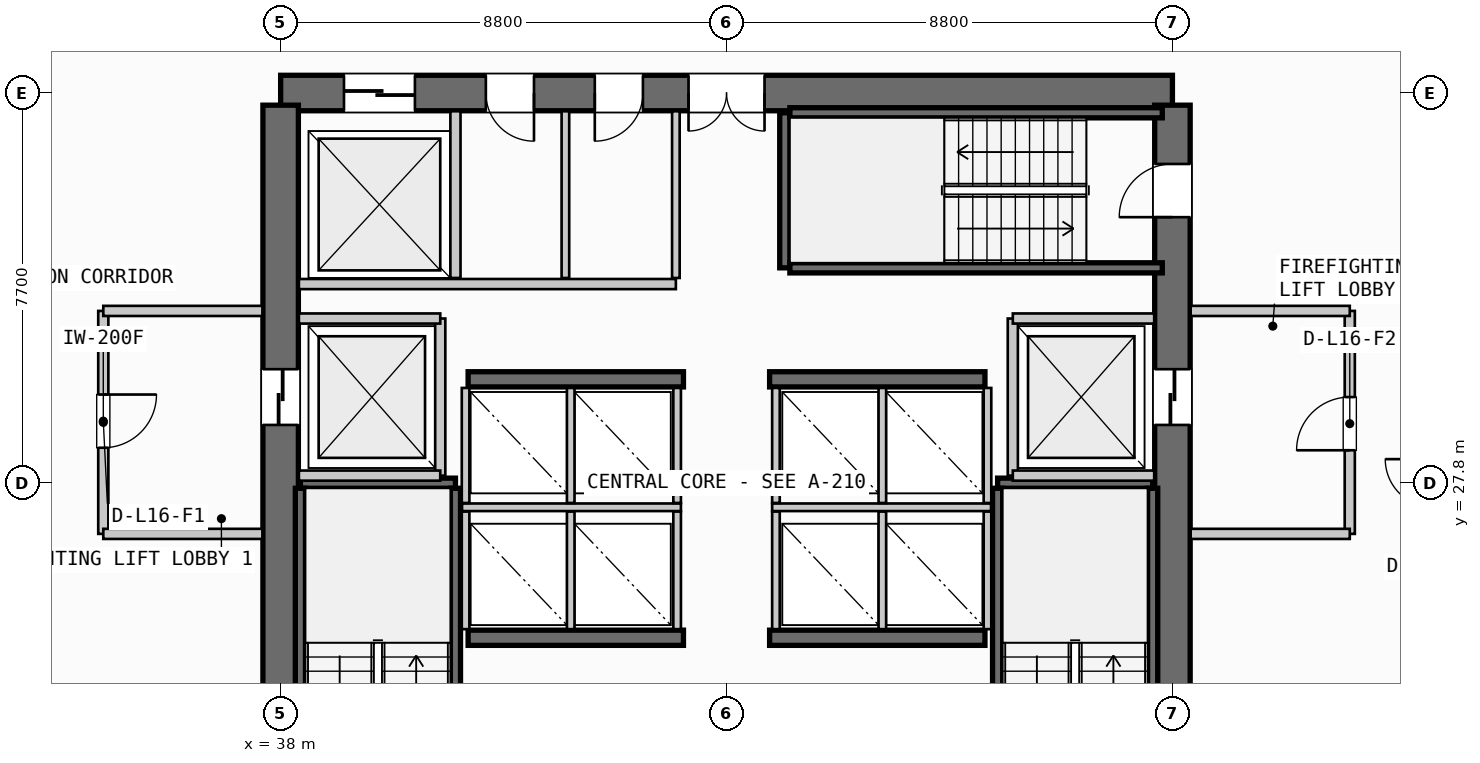
"""IFC4 building model, lengths in metres.
Left out: names, types, materials, properties, quantities, classifications, styles, units other than length and angle.
Written with IfcOpenShell. Run it as: python <this file> out.ifc"""

import sys

from ifc_helpers import new_model, si_unit, direction, frame, frame_2d, origin, place, context, subcontext, project, spatial, rectangle, extrude, source, transform, mapped, element, fill, save


model = new_model("IFC4")
c1 = context("Model", 3, precision=1e-05, world=origin(), true_north=direction((0.0, 1.0)))
c2 = subcontext(c1, "Body", "Model", "MODEL_VIEW")
j1 = project(units=[si_unit("LENGTHUNIT", "METRE"), si_unit("PLANEANGLEUNIT", "RADIAN")], contexts=[c1])
p1 = place(None, origin())
s1 = spatial("IfcSite", under=j1, at=p1, CompositionType="ELEMENT")
p2 = place(p1, origin())
s2 = spatial("IfcBuilding", under=s1, at=p2, CompositionType="ELEMENT")
p3 = place(p2, frame((0.0, 0.0, 67.6)))
s3 = spatial("IfcBuildingStorey", under=s2, at=p3, CompositionType="ELEMENT", Elevation=67.6)
p4 = place(p3, frame((55.6, 35.5, 0.0), z_axis=(0.0, 0.0, 1.0), x_axis=(-1.0, 0.0, 0.0)))
e1 = element("IfcWall", 1, at=p4, inside=s3, PredefinedType="SHEAR", context=c2, shape_type="SweptSolid", body=[
    extrude(rectangle(XDim=17.6, YDim=0.7, at=frame_2d((8.8, 0.0))), origin(), (0.0, 0.0, 1.0), 3.55),
])
p5 = place(p4, frame((8.05, 0.0, 0.0)))
e2 = element("IfcOpeningElement", 2, at=p5, cuts=e1, PredefinedType="OPENING", context=c2, shape_type="SweptSolid", body=[
    extrude(rectangle(XDim=1.5, YDim=2.2, at=frame_2d((0.75, 1.1))), frame((0.0, 0.36, 0.0), z_axis=(0.0, -1.0, 0.0), x_axis=(1.0, 0.0, 0.0)), (0.0, 0.0, 1.0), 0.72),
])
p6 = place(p4, frame((14.95, 0.0, 0.0)))
e3 = element("IfcOpeningElement", 3, at=p6, cuts=e1, PredefinedType="OPENING", context=c2, shape_type="SweptSolid", body=[
    extrude(rectangle(XDim=1.4, YDim=2.3, at=frame_2d((0.7, 1.15))), frame((0.0, 0.36, 0.0), z_axis=(0.0, -1.0, 0.0), x_axis=(1.0, 0.0, 0.0)), (0.0, 0.0, 1.0), 0.72),
])
p7 = place(p4, frame((12.6, 0.0, 0.0)))
e4 = element("IfcOpeningElement", 4, at=p7, cuts=e1, PredefinedType="OPENING", context=c2, shape_type="SweptSolid", body=[
    extrude(rectangle(XDim=0.95, YDim=2.15, at=frame_2d((0.475, 1.075))), frame((0.0, 0.36, 0.0), z_axis=(0.0, -1.0, 0.0), x_axis=(1.0, 0.0, 0.0)), (0.0, 0.0, 1.0), 0.72),
])
p8 = place(p4, frame((10.45, 0.0, 0.0)))
e5 = element("IfcOpeningElement", 5, at=p8, cuts=e1, PredefinedType="OPENING", context=c2, shape_type="SweptSolid", body=[
    extrude(rectangle(XDim=0.95, YDim=2.15, at=frame_2d((0.475, 1.075))), frame((0.0, 0.36, 0.0), z_axis=(0.0, -1.0, 0.0), x_axis=(1.0, 0.0, 0.0)), (0.0, 0.0, 1.0), 0.72),
])
p9 = place(p3, frame((38.0, 35.26, 0.0), z_axis=(0.0, 0.0, 1.0), x_axis=(0.0, -1.0, 0.0)))
e6 = element("IfcWall", 6, at=p9, inside=s3, PredefinedType="SHEAR", context=c2, shape_type="SweptSolid", body=[
    extrude(rectangle(XDim=14.92, YDim=0.7, at=frame_2d((7.46, 0.0))), origin(), (0.0, 0.0, 1.0), 3.55),
])
p10 = place(p9, frame((5.21, 0.0, 0.0)))
e7 = element("IfcOpeningElement", 7, at=p10, cuts=e6, PredefinedType="OPENING", context=c2, shape_type="SweptSolid", body=[
    extrude(rectangle(XDim=1.1, YDim=2.2, at=frame_2d((0.55, 1.1))), frame((0.0, 0.36, 0.0), z_axis=(0.0, -1.0, 0.0), x_axis=(1.0, 0.0, 0.0)), (0.0, 0.0, 1.0), 0.72),
])
p11 = place(p3, frame((55.6, 20.34, 0.0), z_axis=(0.0, 0.0, 1.0), x_axis=(0.0, 1.0, 0.0)))
e8 = element("IfcWall", 8, at=p11, inside=s3, PredefinedType="SHEAR", context=c2, shape_type="SweptSolid", body=[
    extrude(rectangle(XDim=14.92, YDim=0.7, at=frame_2d((7.46, 0.0))), origin(), (0.0, 0.0, 1.0), 3.55),
])
p12 = place(p11, frame((12.71, 0.0, 0.0)))
e9 = element("IfcOpeningElement", 9, at=p12, cuts=e8, PredefinedType="OPENING", context=c2, shape_type="SweptSolid", body=[
    extrude(rectangle(XDim=1.05, YDim=2.15, at=frame_2d((0.525, 1.075))), frame((0.0, 0.36, 0.0), z_axis=(0.0, -1.0, 0.0), x_axis=(1.0, 0.0, 0.0)), (0.0, 0.0, 1.0), 0.72),
])
p13 = place(p11, frame((8.61, 0.0, 0.0)))
e10 = element("IfcOpeningElement", 10, at=p13, cuts=e8, PredefinedType="OPENING", context=c2, shape_type="SweptSolid", body=[
    extrude(rectangle(XDim=1.1, YDim=2.2, at=frame_2d((0.55, 1.1))), frame((0.0, 0.36, 0.0), z_axis=(0.0, -1.0, 0.0), x_axis=(1.0, 0.0, 0.0)), (0.0, 0.0, 1.0), 0.72),
])
for number, where, z_axis, x_axis in (
    (11, (41.7, 24.75, 0.0), (0.0, 0.0, 1.0), (1.0, 0.0, 0.0)),
    (12, (47.65, 24.75, 0.0), (0.0, 0.0, 1.0), (1.0, 0.0, 0.0)),
    (13, (41.7, 29.85, 0.0), (0.0, 0.0, 1.0), (1.0, 0.0, 0.0)),
    (14, (47.65, 29.85, 0.0), (0.0, 0.0, 1.0), (1.0, 0.0, 0.0)),
):
    element("IfcWall", number, at=place(p3, frame(where, z_axis=z_axis, x_axis=x_axis)), inside=s3, PredefinedType="SHEAR", context=c2, shape_type="SweptSolid", body=[
        extrude(rectangle(XDim=4.25, YDim=0.3, at=frame_2d((2.125, 0.0))), origin(), (0.0, 0.0, 1.0), 3.55),
    ])
p14 = place(p3, frame((38.39, 27.8, 0.0), z_axis=(0.0, 0.0, 1.0), x_axis=(1.0, 0.0, 0.0)))
e15 = element("IfcWall", 15, at=p14, inside=s3, PredefinedType="SHEAR", context=c2, shape_type="SweptSolid", body=[
    extrude(rectangle(XDim=3.06, YDim=0.2, at=frame_2d((1.53, 0.0))), origin(), (0.0, 0.0, 1.0), 3.55),
])
for number, where, z_axis, x_axis in (
    (16, (41.45, 27.7, 0.0), (0.0, 0.0, 1.0), (0.0, -1.0, 0.0)),
    (17, (38.39, 20.35, 0.0), (0.0, 0.0, 1.0), (0.0, 1.0, 0.0)),
):
    element("IfcWall", number, at=place(p3, frame(where, z_axis=z_axis, x_axis=x_axis)), inside=s3, PredefinedType="SHEAR", context=c2, shape_type="SweptSolid", body=[
        extrude(rectangle(XDim=7.35, YDim=0.2, at=frame_2d((3.675, 0.0))), origin(), (0.0, 0.0, 1.0), 3.55),
    ])
p15 = place(p3, frame((52.15, 27.8, 0.0), z_axis=(0.0, 0.0, 1.0), x_axis=(1.0, 0.0, 0.0)))
e18 = element("IfcWall", 18, at=p15, inside=s3, PredefinedType="SHEAR", context=c2, shape_type="SweptSolid", body=[
    extrude(rectangle(XDim=3.06, YDim=0.2, at=frame_2d((1.53, 0.0))), origin(), (0.0, 0.0, 1.0), 3.55),
])
for number, where, z_axis, x_axis in (
    (19, (55.21, 27.7, 0.0), (0.0, 0.0, 1.0), (0.0, -1.0, 0.0)),
    (20, (52.15, 20.35, 0.0), (0.0, 0.0, 1.0), (0.0, 1.0, 0.0)),
):
    element("IfcWall", number, at=place(p3, frame(where, z_axis=z_axis, x_axis=x_axis)), inside=s3, PredefinedType="SHEAR", context=c2, shape_type="SweptSolid", body=[
        extrude(rectangle(XDim=7.35, YDim=0.2, at=frame_2d((3.675, 0.0))), origin(), (0.0, 0.0, 1.0), 3.55),
    ])
p16 = place(p3, frame((47.95, 32.05, 0.0), z_axis=(0.0, 0.0, 1.0), x_axis=(0.0, 1.0, 0.0)))
e21 = element("IfcWall", 21, at=p16, inside=s3, PredefinedType="SHEAR", context=c2, shape_type="SweptSolid", body=[
    extrude(rectangle(XDim=3.06, YDim=0.2, at=frame_2d((1.53, 0.0))), origin(), (0.0, 0.0, 1.0), 3.55),
])
for number, where, z_axis, x_axis in (
    (22, (48.05, 35.11, 0.0), (0.0, 0.0, 1.0), (1.0, 0.0, 0.0)),
    (23, (55.4, 32.05, 0.0), (0.0, 0.0, 1.0), (-1.0, 0.0, 0.0)),
):
    element("IfcWall", number, at=place(p3, frame(where, z_axis=z_axis, x_axis=x_axis)), inside=s3, PredefinedType="SHEAR", context=c2, shape_type="SweptSolid", body=[
        extrude(rectangle(XDim=7.35, YDim=0.2, at=frame_2d((3.675, 0.0))), origin(), (0.0, 0.0, 1.0), 3.55),
    ])
p17 = place(p3, frame((41.15, 27.95, 0.0), z_axis=(0.0, 0.0, 1.0), x_axis=(0.0, 1.0, 0.0)))
e24 = element("IfcWall", 24, at=p17, inside=s3, PredefinedType="PARTITIONING", context=c2, shape_type="SweptSolid", body=[
    extrude(rectangle(XDim=3.1, YDim=0.2, at=frame_2d((1.55, 0.0))), origin(), (0.0, 0.0, 1.0), 2.505),
])
for number, where, z_axis, x_axis in (
    (25, (38.36, 27.95, 0.0), (0.0, 0.0, 1.0), (1.0, 0.0, 0.0)),
    (26, (38.36, 31.05, 0.0), (0.0, 0.0, 1.0), (1.0, 0.0, 0.0)),
):
    element("IfcWall", number, at=place(p3, frame(where, z_axis=z_axis, x_axis=x_axis)), inside=s3, PredefinedType="PARTITIONING", context=c2, shape_type="SweptSolid", body=[
        extrude(rectangle(XDim=2.79, YDim=0.2, at=frame_2d((1.395, 0.0))), origin(), (0.0, 0.0, 1.0), 2.505),
    ])
p18 = place(p3, frame((34.5, 31.2, 0.0), z_axis=(0.0, 0.0, 1.0), x_axis=(0.0, -1.0, 0.0)))
e27 = element("IfcWall", 27, at=p18, inside=s3, PredefinedType="PARTITIONING", context=c2, shape_type="SweptSolid", body=[
    extrude(rectangle(XDim=4.4, YDim=0.2, at=frame_2d((2.2, 0.0))), origin(), (0.0, 0.0, 1.0), 2.505),
])
p19 = place(p18, frame((1.65, 0.0, 0.0)))
e28 = element("IfcOpeningElement", 28, at=p19, cuts=e27, PredefinedType="OPENING", context=c2, shape_type="SweptSolid", body=[
    extrude(rectangle(XDim=1.05, YDim=2.15, at=frame_2d((0.525, 1.075))), frame((0.0, 0.11, 0.0), z_axis=(0.0, -1.0, 0.0), x_axis=(1.0, 0.0, 0.0)), (0.0, 0.0, 1.0), 0.22),
])
for number, where, z_axis, x_axis in (
    (29, (34.5, 26.8, 0.0), (0.0, 0.0, 1.0), (1.0, 0.0, 0.0)),
    (30, (34.5, 31.2, 0.0), (0.0, 0.0, 1.0), (1.0, 0.0, 0.0)),
):
    element("IfcWall", number, at=place(p3, frame(where, z_axis=z_axis, x_axis=x_axis)), inside=s3, PredefinedType="PARTITIONING", context=c2, shape_type="SweptSolid", body=[
        extrude(rectangle(XDim=3.14, YDim=0.2, at=frame_2d((1.57, 0.0))), origin(), (0.0, 0.0, 1.0), 2.505),
    ])
p20 = place(p3, frame((52.45, 27.95, 0.0), z_axis=(0.0, 0.0, 1.0), x_axis=(0.0, 1.0, 0.0)))
e31 = element("IfcWall", 31, at=p20, inside=s3, PredefinedType="PARTITIONING", context=c2, shape_type="SweptSolid", body=[
    extrude(rectangle(XDim=3.1, YDim=0.2, at=frame_2d((1.55, 0.0))), origin(), (0.0, 0.0, 1.0), 2.505),
])
for number, where, z_axis, x_axis in (
    (32, (52.45, 27.95, 0.0), (0.0, 0.0, 1.0), (1.0, 0.0, 0.0)),
    (33, (52.45, 31.05, 0.0), (0.0, 0.0, 1.0), (1.0, 0.0, 0.0)),
):
    element("IfcWall", number, at=place(p3, frame(where, z_axis=z_axis, x_axis=x_axis)), inside=s3, PredefinedType="PARTITIONING", context=c2, shape_type="SweptSolid", body=[
        extrude(rectangle(XDim=2.79, YDim=0.2, at=frame_2d((1.395, 0.0))), origin(), (0.0, 0.0, 1.0), 2.505),
    ])
p21 = place(p3, frame((59.1, 26.8, 0.0), z_axis=(0.0, 0.0, 1.0), x_axis=(0.0, 1.0, 0.0)))
e34 = element("IfcWall", 34, at=p21, inside=s3, PredefinedType="PARTITIONING", context=c2, shape_type="SweptSolid", body=[
    extrude(rectangle(XDim=4.4, YDim=0.2, at=frame_2d((2.2, 0.0))), origin(), (0.0, 0.0, 1.0), 2.505),
])
p22 = place(p21, frame((1.65, 0.0, 0.0)))
e35 = element("IfcOpeningElement", 35, at=p22, cuts=e34, PredefinedType="OPENING", context=c2, shape_type="SweptSolid", body=[
    extrude(rectangle(XDim=1.05, YDim=2.15, at=frame_2d((0.525, 1.075))), frame((0.0, 0.11, 0.0), z_axis=(0.0, -1.0, 0.0), x_axis=(1.0, 0.0, 0.0)), (0.0, 0.0, 1.0), 0.22),
])
for number, where, z_axis, x_axis in (
    (36, (55.96, 26.8, 0.0), (0.0, 0.0, 1.0), (1.0, 0.0, 0.0)),
    (37, (55.96, 31.2, 0.0), (0.0, 0.0, 1.0), (1.0, 0.0, 0.0)),
):
    element("IfcWall", number, at=place(p3, frame(where, z_axis=z_axis, x_axis=x_axis)), inside=s3, PredefinedType="PARTITIONING", context=c2, shape_type="SweptSolid", body=[
        extrude(rectangle(XDim=3.14, YDim=0.2, at=frame_2d((1.57, 0.0))), origin(), (0.0, 0.0, 1.0), 2.505),
    ])
p23 = place(p3, frame((41.58, 27.325, 0.0), z_axis=(0.0, 0.0, 1.0), x_axis=(1.0, 0.0, 0.0)))
e38 = element("IfcWall", 38, at=p23, inside=s3, PredefinedType="PARTITIONING", context=c2, shape_type="SweptSolid", body=[
    extrude(rectangle(XDim=4.32, YDim=0.15, at=frame_2d((2.16, 0.0))), origin(), (0.0, 0.0, 1.0), 2.505),
])
p24 = place(p3, frame((47.7, 27.325, 0.0), z_axis=(0.0, 0.0, 1.0), x_axis=(1.0, 0.0, 0.0)))
e39 = element("IfcWall", 39, at=p24, inside=s3, PredefinedType="PARTITIONING", context=c2, shape_type="SweptSolid", body=[
    extrude(rectangle(XDim=4.32, YDim=0.15, at=frame_2d((2.16, 0.0))), origin(), (0.0, 0.0, 1.0), 2.505),
])
for number, where, z_axis, x_axis in (
    (40, (41.65, 24.92, 0.0), (0.0, 0.0, 1.0), (0.0, 1.0, 0.0)),
    (41, (43.725, 24.92, 0.0), (0.0, 0.0, 1.0), (0.0, 1.0, 0.0)),
    (42, (45.825, 24.92, 0.0), (0.0, 0.0, 1.0), (0.0, 1.0, 0.0)),
    (43, (47.775, 24.92, 0.0), (0.0, 0.0, 1.0), (0.0, 1.0, 0.0)),
    (44, (49.875, 24.92, 0.0), (0.0, 0.0, 1.0), (0.0, 1.0, 0.0)),
    (45, (51.95, 24.92, 0.0), (0.0, 0.0, 1.0), (0.0, 1.0, 0.0)),
):
    element("IfcWall", number, at=place(p3, frame(where, z_axis=z_axis, x_axis=x_axis)), inside=s3, PredefinedType="PARTITIONING", context=c2, shape_type="SweptSolid", body=[
        extrude(rectangle(XDim=2.32, YDim=0.15, at=frame_2d((1.16, 0.0))), origin(), (0.0, 0.0, 1.0), 2.505),
    ])
for number, where, z_axis, x_axis in (
    (46, (41.65, 27.41, 0.0), (0.0, 0.0, 1.0), (0.0, 1.0, 0.0)),
    (47, (43.725, 27.41, 0.0), (0.0, 0.0, 1.0), (0.0, 1.0, 0.0)),
    (48, (45.825, 27.41, 0.0), (0.0, 0.0, 1.0), (0.0, 1.0, 0.0)),
    (49, (47.775, 27.41, 0.0), (0.0, 0.0, 1.0), (0.0, 1.0, 0.0)),
    (50, (49.875, 27.41, 0.0), (0.0, 0.0, 1.0), (0.0, 1.0, 0.0)),
    (51, (51.95, 27.41, 0.0), (0.0, 0.0, 1.0), (0.0, 1.0, 0.0)),
):
    element("IfcWall", number, at=place(p3, frame(where, z_axis=z_axis, x_axis=x_axis)), inside=s3, PredefinedType="PARTITIONING", context=c2, shape_type="SweptSolid", body=[
        extrude(rectangle(XDim=2.27, YDim=0.15, at=frame_2d((1.135, 0.0))), origin(), (0.0, 0.0, 1.0), 2.505),
    ])
p25 = place(p3, frame((41.45, 31.85, 0.0), z_axis=(0.0, 0.0, 1.0), x_axis=(0.0, 1.0, 0.0)))
e52 = element("IfcWall", 52, at=p25, inside=s3, PredefinedType="PARTITIONING", context=c2, shape_type="SweptSolid", body=[
    extrude(rectangle(XDim=3.29, YDim=0.2, at=frame_2d((1.645, 0.0))), origin(), (0.0, 0.0, 1.0), 2.505),
])
p26 = place(p3, frame((38.36, 31.73, 0.0), z_axis=(0.0, 0.0, 1.0), x_axis=(1.0, 0.0, 0.0)))
e53 = element("IfcWall", 53, at=p26, inside=s3, PredefinedType="PARTITIONING", context=c2, shape_type="SweptSolid", body=[
    extrude(rectangle(XDim=7.44, YDim=0.2, at=frame_2d((3.72, 0.0))), origin(), (0.0, 0.0, 1.0), 2.505),
])
p27 = place(p3, frame((45.8, 31.85, 0.0), z_axis=(0.0, 0.0, 1.0), x_axis=(0.0, 1.0, 0.0)))
e54 = element("IfcWall", 54, at=p27, inside=s3, PredefinedType="PARTITIONING", context=c2, shape_type="SweptSolid", body=[
    extrude(rectangle(XDim=3.29, YDim=0.15, at=frame_2d((1.645, 0.0))), origin(), (0.0, 0.0, 1.0), 2.505),
])
p28 = place(p3, frame((43.62, 31.85, 0.0), z_axis=(0.0, 0.0, 1.0), x_axis=(0.0, 1.0, 0.0)))
e55 = element("IfcWall", 55, at=p28, inside=s3, PredefinedType="PLUMBINGWALL", context=c2, shape_type="SweptSolid", body=[
    extrude(rectangle(XDim=3.29, YDim=0.15, at=frame_2d((1.645, 0.0))), origin(), (0.0, 0.0, 1.0), 2.505),
])
m1 = source(origin(), c2, "Body", "SweptSolid", [
    extrude(rectangle(XDim=1.05, YDim=2.15, at=frame_2d((0.525, 1.075))), frame((0.0, 0.025, 0.0), z_axis=(0.0, -1.0, 0.0), x_axis=(1.0, 0.0, 0.0)), (0.0, 0.0, 1.0), 0.05),
])
p29 = place(p12, origin())
e56 = element("IfcDoor", 56, at=p29, inside=s3, OperationType="SINGLE_SWING_LEFT", PredefinedType="DOOR", context=c2, shape_type="MappedRepresentation", body=[
    mapped(m1, transform((0.0, 0.0, 0.0), scale=1.0)),
])
fill(e9, e56)
m2 = source(origin(), c2, "Body", "SweptSolid", [
    extrude(rectangle(XDim=1.5, YDim=2.2, at=frame_2d((0.75, 1.1))), frame((0.0, 0.025, 0.0), z_axis=(0.0, -1.0, 0.0), x_axis=(1.0, 0.0, 0.0)), (0.0, 0.0, 1.0), 0.05),
])
p30 = place(p5, origin())
e57 = element("IfcDoor", 57, at=p30, inside=s3, OperationType="DOUBLE_DOOR_SINGLE_SWING", PredefinedType="DOOR", context=c2, shape_type="MappedRepresentation", body=[
    mapped(m2, transform((0.0, 0.0, 0.0), scale=1.0)),
])
fill(e2, e57)
m3 = source(origin(), c2, "Body", "SweptSolid", [
    extrude(rectangle(XDim=1.1, YDim=2.2, at=frame_2d((0.55, 1.1))), frame((0.0, 0.025, 0.0), z_axis=(0.0, -1.0, 0.0), x_axis=(1.0, 0.0, 0.0)), (0.0, 0.0, 1.0), 0.05),
])
p31 = place(p10, origin())
e58 = element("IfcDoor", 58, at=p31, inside=s3, OperationType="SLIDING_TO_LEFT", PredefinedType="DOOR", context=c2, shape_type="MappedRepresentation", body=[
    mapped(m3, transform((0.0, 0.0, 0.0), scale=1.0)),
])
fill(e7, e58)
p32 = place(p13, origin())
e59 = element("IfcDoor", 59, at=p32, inside=s3, OperationType="SLIDING_TO_RIGHT", PredefinedType="DOOR", context=c2, shape_type="MappedRepresentation", body=[
    mapped(m3, transform((0.0, 0.0, 0.0), scale=1.0)),
])
fill(e10, e59)
m4 = source(origin(), c2, "Body", "SweptSolid", [
    extrude(rectangle(XDim=1.4, YDim=2.3, at=frame_2d((0.7, 1.15))), frame((0.0, 0.025, 0.0), z_axis=(0.0, -1.0, 0.0), x_axis=(1.0, 0.0, 0.0)), (0.0, 0.0, 1.0), 0.05),
])
p33 = place(p6, origin())
e60 = element("IfcDoor", 60, at=p33, inside=s3, OperationType="SLIDING_TO_RIGHT", PredefinedType="DOOR", context=c2, shape_type="MappedRepresentation", body=[
    mapped(m4, transform((0.0, 0.0, 0.0), scale=1.0)),
])
fill(e3, e60)
m5 = source(origin(), c2, "Body", "SweptSolid", [
    extrude(rectangle(XDim=0.95, YDim=2.15, at=frame_2d((0.475, 1.075))), frame((0.0, 0.025, 0.0), z_axis=(0.0, -1.0, 0.0), x_axis=(1.0, 0.0, 0.0)), (0.0, 0.0, 1.0), 0.05),
])
p34 = place(p7, origin())
e61 = element("IfcDoor", 61, at=p34, inside=s3, OperationType="SINGLE_SWING_LEFT", PredefinedType="DOOR", context=c2, shape_type="MappedRepresentation", body=[
    mapped(m5, transform((0.0, 0.0, 0.0), scale=1.0)),
])
fill(e4, e61)
p35 = place(p8, origin())
e62 = element("IfcDoor", 62, at=p35, inside=s3, OperationType="SINGLE_SWING_RIGHT", PredefinedType="DOOR", context=c2, shape_type="MappedRepresentation", body=[
    mapped(m5, transform((0.0, 0.0, 0.0), scale=1.0)),
])
fill(e5, e62)
p36 = place(p19, origin())
e63 = element("IfcDoor", 63, at=p36, inside=s3, OperationType="SINGLE_SWING_LEFT", PredefinedType="DOOR", context=c2, shape_type="MappedRepresentation", body=[
    mapped(m1, transform((0.0, 0.0, 0.0), scale=1.0)),
])
fill(e28, e63)
p37 = place(p22, origin())
e64 = element("IfcDoor", 64, at=p37, inside=s3, OperationType="SINGLE_SWING_LEFT", PredefinedType="DOOR", context=c2, shape_type="MappedRepresentation", body=[
    mapped(m1, transform((0.0, 0.0, 0.0), scale=1.0)),
])
fill(e35, e64)
save(model, sys.argv[1])
